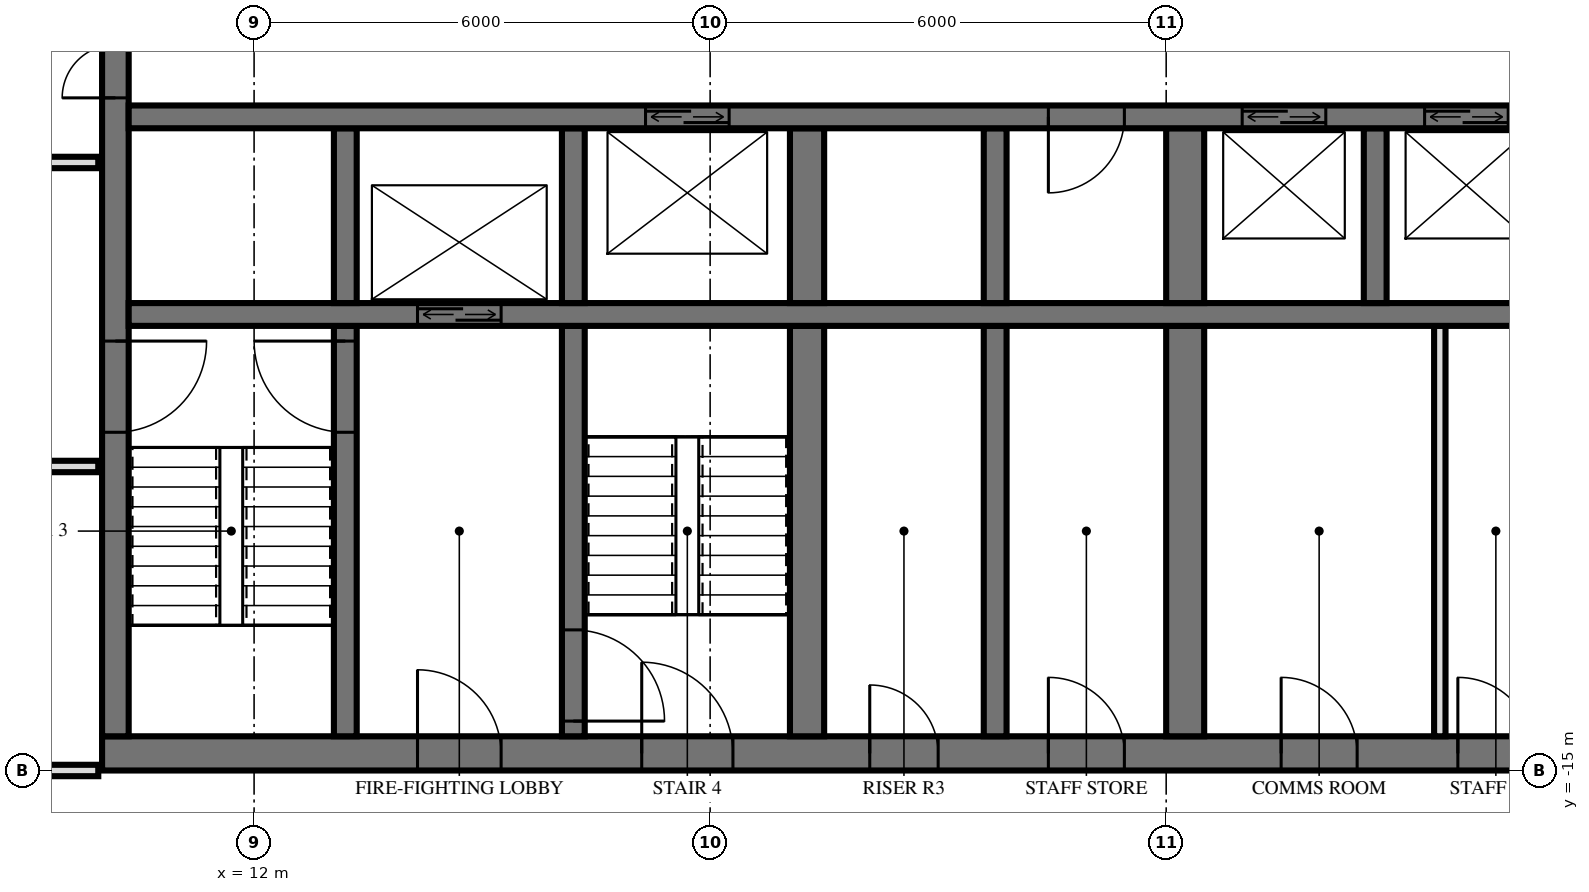
"""IFC4 building model, lengths in metres.
Left out: names, types, materials, properties, quantities, classifications, styles, units other than length and angle.
Written with IfcOpenShell. Run it as: python <this file> out.ifc"""

import sys

from ifc_helpers import new_model, si_unit, direction, frame, frame_2d, origin, place, context, subcontext, project, spatial, rectangle, extrude, element, fill, save


model = new_model("IFC4")
c1 = context("Model", 3, precision=1e-05, world=origin(), true_north=direction((0.0, 1.0)))
c2 = subcontext(c1, "Body", "Model", "MODEL_VIEW")
j1 = project(units=[si_unit("LENGTHUNIT", "METRE"), si_unit("PLANEANGLEUNIT", "RADIAN")], contexts=[c1])
p1 = place(None, origin())
s1 = spatial("IfcSite", under=j1, at=p1, CompositionType="ELEMENT")
p2 = place(p1, origin())
s2 = spatial("IfcBuilding", under=s1, at=p2, CompositionType="ELEMENT")
p3 = place(p2, frame((0.0, 0.0, 74.4)))
s3 = spatial("IfcBuildingStorey", under=s2, at=p3, CompositionType="ELEMENT", Elevation=74.4)
p4 = place(p3, frame((10.0, -14.775, 0.0), z_axis=(0.0, 0.0, 1.0), x_axis=(1.0, 0.0, 0.0)))
e1 = element("IfcWall", 1, at=p4, inside=s3, PredefinedType="SHEAR", context=c2, shape_type="SweptSolid", body=[
    extrude(rectangle(XDim=19.5, YDim=0.45, at=frame_2d((9.75, 0.0))), origin(), (0.0, 0.0, 1.0), 3.6),
])
p5 = place(p4, frame((7.1, 0.0, 0.0)))
e2 = element("IfcOpeningElement", 2, at=p5, cuts=e1, PredefinedType="OPENING", context=c2, shape_type="SweptSolid", body=[
    extrude(rectangle(XDim=1.2, YDim=2.1, at=frame_2d((0.6, 1.05))), frame((0.0, 0.235, 0.0), z_axis=(0.0, -1.0, 0.0), x_axis=(1.0, 0.0, 0.0)), (0.0, 0.0, 1.0), 0.47),
])
p6 = place(p4, frame((4.15, 0.0, 0.0)))
e3 = element("IfcOpeningElement", 3, at=p6, cuts=e1, PredefinedType="OPENING", context=c2, shape_type="SweptSolid", body=[
    extrude(rectangle(XDim=1.1, YDim=2.1, at=frame_2d((0.55, 1.05))), frame((0.0, 0.235, 0.0), z_axis=(0.0, -1.0, 0.0), x_axis=(1.0, 0.0, 0.0)), (0.0, 0.0, 1.0), 0.47),
])
p7 = place(p4, frame((10.1, 0.0, 0.0)))
e4 = element("IfcOpeningElement", 4, at=p7, cuts=e1, PredefinedType="OPENING", context=c2, shape_type="SweptSolid", body=[
    extrude(rectangle(XDim=0.9, YDim=2.1, at=frame_2d((0.45, 1.05))), frame((0.0, 0.235, 0.0), z_axis=(0.0, -1.0, 0.0), x_axis=(1.0, 0.0, 0.0)), (0.0, 0.0, 1.0), 0.47),
])
p8 = place(p4, frame((12.45, 0.0, 0.0)))
e5 = element("IfcOpeningElement", 5, at=p8, cuts=e1, PredefinedType="OPENING", context=c2, shape_type="SweptSolid", body=[
    extrude(rectangle(XDim=1.0, YDim=2.1, at=frame_2d((0.5, 1.05))), frame((0.0, 0.235, 0.0), z_axis=(0.0, -1.0, 0.0), x_axis=(1.0, 0.0, 0.0)), (0.0, 0.0, 1.0), 0.47),
])
p9 = place(p4, frame((15.512, 0.0, 0.0)))
e6 = element("IfcOpeningElement", 6, at=p9, cuts=e1, PredefinedType="OPENING", context=c2, shape_type="SweptSolid", body=[
    extrude(rectangle(XDim=1.0, YDim=2.1, at=frame_2d((0.5, 1.05))), frame((0.0, 0.235, 0.0), z_axis=(0.0, -1.0, 0.0), x_axis=(1.0, 0.0, 0.0)), (0.0, 0.0, 1.0), 0.47),
])
p10 = place(p4, frame((17.837, 0.0, 0.0)))
e7 = element("IfcOpeningElement", 7, at=p10, cuts=e1, PredefinedType="OPENING", context=c2, shape_type="SweptSolid", body=[
    extrude(rectangle(XDim=1.0, YDim=2.1, at=frame_2d((0.5, 1.05))), frame((0.0, 0.235, 0.0), z_axis=(0.0, -1.0, 0.0), x_axis=(1.0, 0.0, 0.0)), (0.0, 0.0, 1.0), 0.47),
])
p11 = place(p3, frame((10.175, -14.55, 0.0), z_axis=(0.0, 0.0, 1.0), x_axis=(0.0, 1.0, 0.0)))
e8 = element("IfcWall", 8, at=p11, inside=s3, PredefinedType="SHEAR", context=c2, shape_type="SweptSolid", body=[
    extrude(rectangle(XDim=14.1, YDim=0.35, at=frame_2d((7.05, 0.0))), origin(), (0.0, 0.0, 1.0), 3.6),
])
p12 = place(p11, frame((8.4, 0.0, 0.0)))
e9 = element("IfcOpeningElement", 9, at=p12, cuts=e8, PredefinedType="OPENING", context=c2, shape_type="SweptSolid", body=[
    extrude(rectangle(XDim=1.4, YDim=2.4, at=frame_2d((0.7, 1.2))), frame((0.0, 0.185, 0.0), z_axis=(0.0, -1.0, 0.0), x_axis=(1.0, 0.0, 0.0)), (0.0, 0.0, 1.0), 0.37),
])
p13 = place(p11, frame((10.0, 0.0, 0.0)))
e10 = element("IfcOpeningElement", 10, at=p13, cuts=e8, PredefinedType="OPENING", context=c2, shape_type="SweptSolid", body=[
    extrude(rectangle(XDim=1.4, YDim=2.4, at=frame_2d((0.7, 1.2))), frame((0.0, 0.185, 0.0), z_axis=(0.0, -1.0, 0.0), x_axis=(1.0, 0.0, 0.0)), (0.0, 0.0, 1.0), 0.37),
])
p14 = place(p11, frame((4.0, 0.0, 0.0)))
e11 = element("IfcOpeningElement", 11, at=p14, cuts=e8, PredefinedType="OPENING", context=c2, shape_type="SweptSolid", body=[
    extrude(rectangle(XDim=1.2, YDim=2.1, at=frame_2d((0.6, 1.05))), frame((0.0, 0.185, 0.0), z_axis=(0.0, -1.0, 0.0), x_axis=(1.0, 0.0, 0.0)), (0.0, 0.0, 1.0), 0.37),
])
p15 = place(p3, frame((10.35, -6.4, 0.0), z_axis=(0.0, 0.0, 1.0), x_axis=(1.0, 0.0, 0.0)))
e12 = element("IfcWall", 12, at=p15, inside=s3, PredefinedType="SHEAR", context=c2, shape_type="SweptSolid", body=[
    extrude(rectangle(XDim=18.7, YDim=0.3, at=frame_2d((9.35, 0.0))), origin(), (0.0, 0.0, 1.0), 3.6),
])
p16 = place(p15, frame((14.65, 0.0, 0.0)))
e13 = element("IfcOpeningElement", 13, at=p16, cuts=e12, PredefinedType="OPENING", context=c2, shape_type="SweptSolid", body=[
    extrude(rectangle(XDim=1.1, YDim=2.1, at=frame_2d((0.55, 1.05))), frame((0.0, 0.16, 0.0), z_axis=(0.0, -1.0, 0.0), x_axis=(1.0, 0.0, 0.0)), (0.0, 0.0, 1.0), 0.32),
])
p17 = place(p15, frame((17.05, 0.0, 0.0)))
e14 = element("IfcOpeningElement", 14, at=p17, cuts=e12, PredefinedType="OPENING", context=c2, shape_type="SweptSolid", body=[
    extrude(rectangle(XDim=1.1, YDim=2.1, at=frame_2d((0.55, 1.05))), frame((0.0, 0.16, 0.0), z_axis=(0.0, -1.0, 0.0), x_axis=(1.0, 0.0, 0.0)), (0.0, 0.0, 1.0), 0.32),
])
p18 = place(p15, frame((6.8, 0.0, 0.0)))
e15 = element("IfcOpeningElement", 15, at=p18, cuts=e12, PredefinedType="OPENING", context=c2, shape_type="SweptSolid", body=[
    extrude(rectangle(XDim=1.1, YDim=2.1, at=frame_2d((0.55, 1.05))), frame((0.0, 0.16, 0.0), z_axis=(0.0, -1.0, 0.0), x_axis=(1.0, 0.0, 0.0)), (0.0, 0.0, 1.0), 0.32),
])
p19 = place(p15, frame((12.1, 0.0, 0.0)))
e16 = element("IfcOpeningElement", 16, at=p19, cuts=e12, PredefinedType="OPENING", context=c2, shape_type="SweptSolid", body=[
    extrude(rectangle(XDim=1.0, YDim=2.1, at=frame_2d((0.5, 1.05))), frame((0.0, 0.16, 0.0), z_axis=(0.0, -1.0, 0.0), x_axis=(1.0, 0.0, 0.0)), (0.0, 0.0, 1.0), 0.32),
])
p20 = place(p3, frame((10.35, -9.0, 0.0), z_axis=(0.0, 0.0, 1.0), x_axis=(1.0, 0.0, 0.0)))
e17 = element("IfcWall", 17, at=p20, inside=s3, PredefinedType="SHEAR", context=c2, shape_type="SweptSolid", body=[
    extrude(rectangle(XDim=18.7, YDim=0.3, at=frame_2d((9.35, 0.0))), origin(), (0.0, 0.0, 1.0), 3.6),
])
p21 = place(p20, frame((3.8, 0.0, 0.0)))
e18 = element("IfcOpeningElement", 18, at=p21, cuts=e17, PredefinedType="OPENING", context=c2, shape_type="SweptSolid", body=[
    extrude(rectangle(XDim=1.1, YDim=2.1, at=frame_2d((0.55, 1.05))), frame((0.0, 0.16, 0.0), z_axis=(0.0, -1.0, 0.0), x_axis=(1.0, 0.0, 0.0)), (0.0, 0.0, 1.0), 0.32),
])
p22 = place(p3, frame((13.2, -8.85, 0.0), z_axis=(0.0, 0.0, 1.0), x_axis=(0.0, 1.0, 0.0)))
e19 = element("IfcWall", 19, at=p22, inside=s3, PredefinedType="SHEAR", context=c2, shape_type="SweptSolid", body=[
    extrude(rectangle(XDim=2.3, YDim=0.3, at=frame_2d((1.15, 0.0))), origin(), (0.0, 0.0, 1.0), 3.6),
])
p23 = place(p3, frame((13.2, -14.55, 0.0), z_axis=(0.0, 0.0, 1.0), x_axis=(0.0, 1.0, 0.0)))
e20 = element("IfcWall", 20, at=p23, inside=s3, PredefinedType="SHEAR", context=c2, shape_type="SweptSolid", body=[
    extrude(rectangle(XDim=5.4, YDim=0.3, at=frame_2d((2.7, 0.0))), origin(), (0.0, 0.0, 1.0), 3.6),
])
p24 = place(p23, frame((4.0, 0.0, 0.0)))
e21 = element("IfcOpeningElement", 21, at=p24, cuts=e20, PredefinedType="OPENING", context=c2, shape_type="SweptSolid", body=[
    extrude(rectangle(XDim=1.2, YDim=2.1, at=frame_2d((0.6, 1.05))), frame((0.0, 0.16, 0.0), z_axis=(0.0, -1.0, 0.0), x_axis=(1.0, 0.0, 0.0)), (0.0, 0.0, 1.0), 0.32),
])
p25 = place(p3, frame((16.2, -8.85, 0.0), z_axis=(0.0, 0.0, 1.0), x_axis=(0.0, 1.0, 0.0)))
e22 = element("IfcWall", 22, at=p25, inside=s3, PredefinedType="SHEAR", context=c2, shape_type="SweptSolid", body=[
    extrude(rectangle(XDim=2.3, YDim=0.3, at=frame_2d((1.15, 0.0))), origin(), (0.0, 0.0, 1.0), 3.6),
])
p26 = place(p3, frame((16.2, -14.55, 0.0), z_axis=(0.0, 0.0, 1.0), x_axis=(0.0, 1.0, 0.0)))
e23 = element("IfcWall", 23, at=p26, inside=s3, PredefinedType="SHEAR", context=c2, shape_type="SweptSolid", body=[
    extrude(rectangle(XDim=5.4, YDim=0.3, at=frame_2d((2.7, 0.0))), origin(), (0.0, 0.0, 1.0), 3.6),
])
p27 = place(p26, frame((0.2, 0.0, 0.0)))
e24 = element("IfcOpeningElement", 24, at=p27, cuts=e23, PredefinedType="OPENING", context=c2, shape_type="SweptSolid", body=[
    extrude(rectangle(XDim=1.2, YDim=2.1, at=frame_2d((0.6, 1.05))), frame((0.0, 0.16, 0.0), z_axis=(0.0, -1.0, 0.0), x_axis=(1.0, 0.0, 0.0)), (0.0, 0.0, 1.0), 0.32),
])
p28 = place(p3, frame((19.275, -8.85, 0.0), z_axis=(0.0, 0.0, 1.0), x_axis=(0.0, 1.0, 0.0)))
e25 = element("IfcWall", 25, at=p28, inside=s3, PredefinedType="SHEAR", context=c2, shape_type="SweptSolid", body=[
    extrude(rectangle(XDim=2.3, YDim=0.45, at=frame_2d((1.15, 0.0))), origin(), (0.0, 0.0, 1.0), 3.6),
])
p29 = place(p3, frame((19.275, -14.55, 0.0), z_axis=(0.0, 0.0, 1.0), x_axis=(0.0, 1.0, 0.0)))
e26 = element("IfcWall", 26, at=p29, inside=s3, PredefinedType="SHEAR", context=c2, shape_type="SweptSolid", body=[
    extrude(rectangle(XDim=5.4, YDim=0.45, at=frame_2d((2.7, 0.0))), origin(), (0.0, 0.0, 1.0), 3.6),
])
p30 = place(p3, frame((21.75, -8.85, 0.0), z_axis=(0.0, 0.0, 1.0), x_axis=(0.0, 1.0, 0.0)))
e27 = element("IfcWall", 27, at=p30, inside=s3, PredefinedType="SHEAR", context=c2, shape_type="SweptSolid", body=[
    extrude(rectangle(XDim=2.3, YDim=0.3, at=frame_2d((1.15, 0.0))), origin(), (0.0, 0.0, 1.0), 3.6),
])
p31 = place(p3, frame((21.75, -14.55, 0.0), z_axis=(0.0, 0.0, 1.0), x_axis=(0.0, 1.0, 0.0)))
e28 = element("IfcWall", 28, at=p31, inside=s3, PredefinedType="SHEAR", context=c2, shape_type="SweptSolid", body=[
    extrude(rectangle(XDim=5.4, YDim=0.3, at=frame_2d((2.7, 0.0))), origin(), (0.0, 0.0, 1.0), 3.6),
])
p32 = place(p3, frame((24.25, -8.85, 0.0), z_axis=(0.0, 0.0, 1.0), x_axis=(0.0, 1.0, 0.0)))
e29 = element("IfcWall", 29, at=p32, inside=s3, PredefinedType="SHEAR", context=c2, shape_type="SweptSolid", body=[
    extrude(rectangle(XDim=2.3, YDim=0.5, at=frame_2d((1.15, 0.0))), origin(), (0.0, 0.0, 1.0), 3.6),
])
p33 = place(p3, frame((24.25, -14.55, 0.0), z_axis=(0.0, 0.0, 1.0), x_axis=(0.0, 1.0, 0.0)))
e30 = element("IfcWall", 30, at=p33, inside=s3, PredefinedType="SHEAR", context=c2, shape_type="SweptSolid", body=[
    extrude(rectangle(XDim=5.4, YDim=0.5, at=frame_2d((2.7, 0.0))), origin(), (0.0, 0.0, 1.0), 3.6),
])
p34 = place(p3, frame((26.75, -8.85, 0.0), z_axis=(0.0, 0.0, 1.0), x_axis=(0.0, 1.0, 0.0)))
e31 = element("IfcWall", 31, at=p34, inside=s3, PredefinedType="SHEAR", context=c2, shape_type="SweptSolid", body=[
    extrude(rectangle(XDim=2.3, YDim=0.3, at=frame_2d((1.15, 0.0))), origin(), (0.0, 0.0, 1.0), 3.6),
])
p35 = place(p3, frame((27.6, -14.55, 0.0), z_axis=(0.0, 0.0, 1.0), x_axis=(0.0, 1.0, 0.0)))
e32 = element("IfcWall", 32, at=p35, inside=s3, PredefinedType="PARTITIONING", context=c2, shape_type="SweptSolid", body=[
    extrude(rectangle(XDim=5.4, YDim=0.15, at=frame_2d((2.7, 0.0))), origin(), (0.0, 0.0, 1.0), 3.3),
])
p36 = place(p3, frame((-9.95, -15.0, 0.0), z_axis=(0.0, 0.0, 1.0), x_axis=(1.0, 0.0, 0.0)))
e33 = element("IfcWall", 33, at=p36, inside=s3, PredefinedType="PARTITIONING", context=c2, shape_type="SweptSolid", body=[
    extrude(rectangle(XDim=19.9, YDim=0.15, at=frame_2d((9.95, 0.0))), origin(), (0.0, 0.0, 1.0), 2.684),
])
p37 = place(p36, frame((9.45, 0.0, 0.0)))
e34 = element("IfcOpeningElement", 34, at=p37, cuts=e33, PredefinedType="OPENING", context=c2, shape_type="SweptSolid", body=[
    extrude(rectangle(XDim=1.0, YDim=2.1, at=frame_2d((0.5, 1.05))), frame((0.0, 0.085, 0.0), z_axis=(0.0, -1.0, 0.0), x_axis=(1.0, 0.0, 0.0)), (0.0, 0.0, 1.0), 0.17),
])
p38 = place(p3, frame((-9.95, -11.0, 0.0), z_axis=(0.0, 0.0, 1.0), x_axis=(1.0, 0.0, 0.0)))
e35 = element("IfcWall", 35, at=p38, inside=s3, PredefinedType="PARTITIONING", context=c2, shape_type="SweptSolid", body=[
    extrude(rectangle(XDim=19.9, YDim=0.15, at=frame_2d((9.95, 0.0))), origin(), (0.0, 0.0, 1.0), 3.32),
])
p39 = place(p38, frame((9.45, 0.0, 0.0)))
e36 = element("IfcOpeningElement", 36, at=p39, cuts=e35, PredefinedType="OPENING", context=c2, shape_type="SweptSolid", body=[
    extrude(rectangle(XDim=1.0, YDim=2.1, at=frame_2d((0.5, 1.05))), frame((0.0, 0.085, 0.0), z_axis=(0.0, -1.0, 0.0), x_axis=(1.0, 0.0, 0.0)), (0.0, 0.0, 1.0), 0.17),
])
p40 = place(p38, frame((15.45, 0.0, 0.0)))
e37 = element("IfcOpeningElement", 37, at=p40, cuts=e35, PredefinedType="OPENING", context=c2, shape_type="SweptSolid", body=[
    extrude(rectangle(XDim=1.0, YDim=2.1, at=frame_2d((0.5, 1.05))), frame((0.0, 0.085, 0.0), z_axis=(0.0, -1.0, 0.0), x_axis=(1.0, 0.0, 0.0)), (0.0, 0.0, 1.0), 0.17),
])
p41 = place(p3, frame((-9.95, -7.0, 0.0), z_axis=(0.0, 0.0, 1.0), x_axis=(1.0, 0.0, 0.0)))
e38 = element("IfcWall", 38, at=p41, inside=s3, PredefinedType="PARTITIONING", context=c2, shape_type="SweptSolid", body=[
    extrude(rectangle(XDim=19.9, YDim=0.15, at=frame_2d((9.95, 0.0))), origin(), (0.0, 0.0, 1.0), 3.32),
])
p42 = place(p41, frame((9.45, 0.0, 0.0)))
e39 = element("IfcOpeningElement", 39, at=p42, cuts=e38, PredefinedType="OPENING", context=c2, shape_type="SweptSolid", body=[
    extrude(rectangle(XDim=1.0, YDim=2.1, at=frame_2d((0.5, 1.05))), frame((0.0, 0.085, 0.0), z_axis=(0.0, -1.0, 0.0), x_axis=(1.0, 0.0, 0.0)), (0.0, 0.0, 1.0), 0.17),
])
p43 = place(p41, frame((3.45, 0.0, 0.0)))
e40 = element("IfcOpeningElement", 40, at=p43, cuts=e38, PredefinedType="OPENING", context=c2, shape_type="SweptSolid", body=[
    extrude(rectangle(XDim=1.0, YDim=2.1, at=frame_2d((0.5, 1.05))), frame((0.0, 0.085, 0.0), z_axis=(0.0, -1.0, 0.0), x_axis=(1.0, 0.0, 0.0)), (0.0, 0.0, 1.0), 0.17),
])
p44 = place(p16, origin())
e41 = element("IfcDoor", 41, at=p44, inside=s3, OperationType="DOUBLE_DOOR_SLIDING", PredefinedType="USERDEFINED", context=c2, shape_type="SweptSolid", body=[
    extrude(rectangle(XDim=1.1, YDim=2.1, at=frame_2d((0.55, 1.05))), frame((0.0, 0.025, 0.0), z_axis=(0.0, -1.0, 0.0), x_axis=(1.0, 0.0, 0.0)), (0.0, 0.0, 1.0), 0.05),
])
fill(e13, e41)
p45 = place(p17, origin())
e42 = element("IfcDoor", 42, at=p45, inside=s3, OperationType="DOUBLE_DOOR_SLIDING", PredefinedType="USERDEFINED", context=c2, shape_type="SweptSolid", body=[
    extrude(rectangle(XDim=1.1, YDim=2.1, at=frame_2d((0.55, 1.05))), frame((0.0, 0.025, 0.0), z_axis=(0.0, -1.0, 0.0), x_axis=(1.0, 0.0, 0.0)), (0.0, 0.0, 1.0), 0.05),
])
fill(e14, e42)
p46 = place(p21, origin())
e43 = element("IfcDoor", 43, at=p46, inside=s3, OperationType="DOUBLE_DOOR_SLIDING", PredefinedType="USERDEFINED", context=c2, shape_type="SweptSolid", body=[
    extrude(rectangle(XDim=1.1, YDim=2.1, at=frame_2d((0.55, 1.05))), frame((0.0, 0.025, 0.0), z_axis=(0.0, -1.0, 0.0), x_axis=(1.0, 0.0, 0.0)), (0.0, 0.0, 1.0), 0.05),
])
fill(e18, e43)
p47 = place(p18, origin())
e44 = element("IfcDoor", 44, at=p47, inside=s3, OperationType="DOUBLE_DOOR_SLIDING", PredefinedType="USERDEFINED", context=c2, shape_type="SweptSolid", body=[
    extrude(rectangle(XDim=1.1, YDim=2.1, at=frame_2d((0.55, 1.05))), frame((0.0, 0.025, 0.0), z_axis=(0.0, -1.0, 0.0), x_axis=(1.0, 0.0, 0.0)), (0.0, 0.0, 1.0), 0.05),
])
fill(e15, e44)
p48 = place(p12, origin())
e45 = element("IfcDoor", 45, at=p48, inside=s3, OperationType="DOUBLE_DOOR_SINGLE_SWING", PredefinedType="DOOR", context=c2, shape_type="SweptSolid", body=[
    extrude(rectangle(XDim=1.4, YDim=2.4, at=frame_2d((0.7, 1.2))), frame((0.0, 0.025, 0.0), z_axis=(0.0, -1.0, 0.0), x_axis=(1.0, 0.0, 0.0)), (0.0, 0.0, 1.0), 0.05),
])
fill(e9, e45)
p49 = place(p14, frame((0.6, 0.0, 0.0), z_axis=(0.0, 0.0, 1.0), x_axis=(-1.0, 0.0, 0.0)))
e46 = element("IfcDoor", 46, at=p49, inside=s3, OperationType="SINGLE_SWING_RIGHT", PredefinedType="DOOR", context=c2, shape_type="SweptSolid", body=[
    extrude(rectangle(XDim=1.2, YDim=2.1, at=frame_2d((0.0, 1.05))), frame((0.0, -0.025, 0.0), z_axis=(0.0, 1.0, 0.0), x_axis=(-1.0, 0.0, 0.0)), (0.0, 0.0, 1.0), 0.05),
])
fill(e11, e46)
p50 = place(p5, origin())
e47 = element("IfcDoor", 47, at=p50, inside=s3, OperationType="SINGLE_SWING_RIGHT", PredefinedType="DOOR", context=c2, shape_type="SweptSolid", body=[
    extrude(rectangle(XDim=1.2, YDim=2.1, at=frame_2d((0.6, 1.05))), frame((0.0, 0.025, 0.0), z_axis=(0.0, -1.0, 0.0), x_axis=(1.0, 0.0, 0.0)), (0.0, 0.0, 1.0), 0.05),
])
fill(e2, e47)
p51 = place(p6, origin())
e48 = element("IfcDoor", 48, at=p51, inside=s3, OperationType="SINGLE_SWING_RIGHT", PredefinedType="DOOR", context=c2, shape_type="SweptSolid", body=[
    extrude(rectangle(XDim=1.1, YDim=2.1, at=frame_2d((0.55, 1.05))), frame((0.0, 0.025, 0.0), z_axis=(0.0, -1.0, 0.0), x_axis=(1.0, 0.0, 0.0)), (0.0, 0.0, 1.0), 0.05),
])
fill(e3, e48)
p52 = place(p7, origin())
e49 = element("IfcDoor", 49, at=p52, inside=s3, OperationType="SINGLE_SWING_RIGHT", PredefinedType="DOOR", context=c2, shape_type="SweptSolid", body=[
    extrude(rectangle(XDim=0.9, YDim=2.1, at=frame_2d((0.45, 1.05))), frame((0.0, 0.025, 0.0), z_axis=(0.0, -1.0, 0.0), x_axis=(1.0, 0.0, 0.0)), (0.0, 0.0, 1.0), 0.05),
])
fill(e4, e49)
p53 = place(p8, origin())
e50 = element("IfcDoor", 50, at=p53, inside=s3, OperationType="SINGLE_SWING_RIGHT", PredefinedType="DOOR", context=c2, shape_type="SweptSolid", body=[
    extrude(rectangle(XDim=1.0, YDim=2.1, at=frame_2d((0.5, 1.05))), frame((0.0, 0.025, 0.0), z_axis=(0.0, -1.0, 0.0), x_axis=(1.0, 0.0, 0.0)), (0.0, 0.0, 1.0), 0.05),
])
fill(e5, e50)
p54 = place(p9, origin())
e51 = element("IfcDoor", 51, at=p54, inside=s3, OperationType="SINGLE_SWING_RIGHT", PredefinedType="DOOR", context=c2, shape_type="SweptSolid", body=[
    extrude(rectangle(XDim=1.0, YDim=2.1, at=frame_2d((0.5, 1.05))), frame((0.0, 0.025, 0.0), z_axis=(0.0, -1.0, 0.0), x_axis=(1.0, 0.0, 0.0)), (0.0, 0.0, 1.0), 0.05),
])
fill(e6, e51)
p55 = place(p10, origin())
e52 = element("IfcDoor", 52, at=p55, inside=s3, OperationType="SINGLE_SWING_RIGHT", PredefinedType="DOOR", context=c2, shape_type="SweptSolid", body=[
    extrude(rectangle(XDim=1.0, YDim=2.1, at=frame_2d((0.5, 1.05))), frame((0.0, 0.025, 0.0), z_axis=(0.0, -1.0, 0.0), x_axis=(1.0, 0.0, 0.0)), (0.0, 0.0, 1.0), 0.05),
])
fill(e7, e52)
p56 = place(p19, frame((0.5, 0.0, 0.0), z_axis=(0.0, 0.0, 1.0), x_axis=(-1.0, 0.0, 0.0)))
e53 = element("IfcDoor", 53, at=p56, inside=s3, OperationType="SINGLE_SWING_LEFT", PredefinedType="DOOR", context=c2, shape_type="SweptSolid", body=[
    extrude(rectangle(XDim=1.0, YDim=2.1, at=frame_2d((0.0, 1.05))), frame((0.0, -0.025, 0.0), z_axis=(0.0, 1.0, 0.0), x_axis=(-1.0, 0.0, 0.0)), (0.0, 0.0, 1.0), 0.05),
])
fill(e16, e53)
p57 = place(p24, origin())
e54 = element("IfcDoor", 54, at=p57, inside=s3, OperationType="SINGLE_SWING_LEFT", PredefinedType="DOOR", context=c2, shape_type="SweptSolid", body=[
    extrude(rectangle(XDim=1.2, YDim=2.1, at=frame_2d((0.6, 1.05))), frame((0.0, 0.025, 0.0), z_axis=(0.0, -1.0, 0.0), x_axis=(1.0, 0.0, 0.0)), (0.0, 0.0, 1.0), 0.05),
])
fill(e21, e54)
p58 = place(p27, frame((0.6, 0.0, 0.0), z_axis=(0.0, 0.0, 1.0), x_axis=(-1.0, 0.0, 0.0)))
e55 = element("IfcDoor", 55, at=p58, inside=s3, OperationType="SINGLE_SWING_LEFT", PredefinedType="DOOR", context=c2, shape_type="SweptSolid", body=[
    extrude(rectangle(XDim=1.2, YDim=2.1, at=frame_2d((0.0, 1.05))), frame((0.0, -0.025, 0.0), z_axis=(0.0, 1.0, 0.0), x_axis=(-1.0, 0.0, 0.0)), (0.0, 0.0, 1.0), 0.05),
])
fill(e24, e55)
save(model, sys.argv[1])
